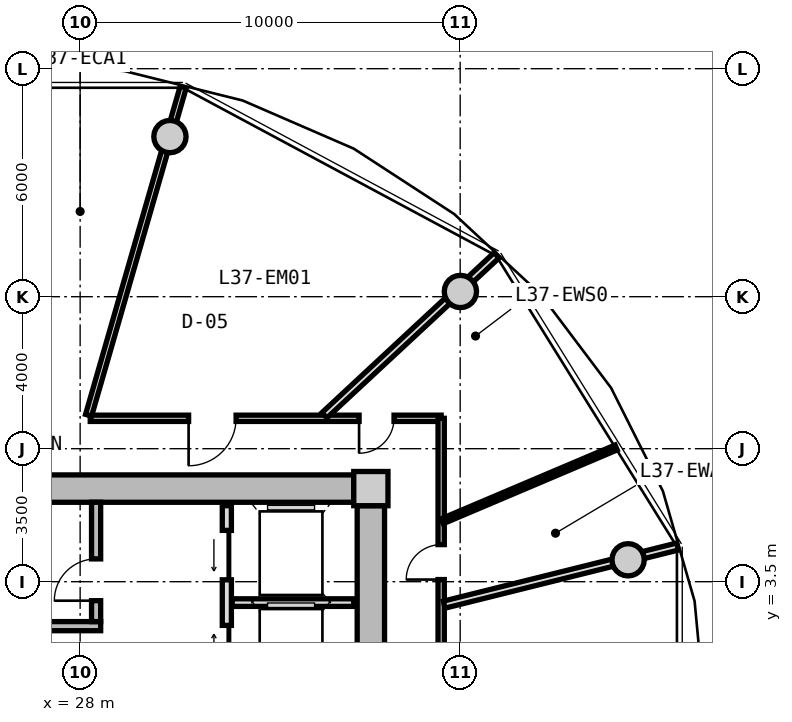
"""IFC4 building model, lengths in metres.
Left out: names, types, materials, properties, quantities, classifications, styles, units other than length and angle.
Written with IfcOpenShell. Run it as: python <this file> out.ifc"""

import sys

from ifc_helpers import new_model, si_unit, direction, frame, frame_2d, origin, origin_2d, place, context, subcontext, project, spatial, rectangle, circle, extrude, source, transform, mapped, element, fill, save


model = new_model("IFC4")
c1 = context("Model", 3, precision=1e-05, world=origin(), true_north=direction((0.0, 1.0)))
c2 = subcontext(c1, "Body", "Model", "MODEL_VIEW")
j1 = project(units=[si_unit("LENGTHUNIT", "METRE"), si_unit("PLANEANGLEUNIT", "RADIAN")], contexts=[c1])
p1 = place(None, origin())
s1 = spatial("IfcSite", under=j1, at=p1, CompositionType="ELEMENT")
p2 = place(p1, origin())
s2 = spatial("IfcBuilding", under=s1, at=p2, CompositionType="ELEMENT")
p3 = place(p2, frame((0.0, 0.0, 120.65)))
s3 = spatial("IfcBuildingStorey", under=s2, at=p3, CompositionType="ELEMENT", Elevation=120.65)
m1 = source(origin(), c2, "Body", "SweptSolid", [
    extrude(rectangle(XDim=0.9, YDim=0.9, at=origin_2d()), origin(), (0.0, 0.0, 1.0), 3.05),
])
p4 = place(p3, frame((35.65, 5.95, 0.0), z_axis=(0.0, 0.0, 1.0), x_axis=(1.0, 0.0, 0.0)))
e1 = element("IfcColumn", 1, at=p4, inside=s3, PredefinedType="COLUMN", context=c2, shape_type="MappedRepresentation", body=[
    mapped(m1, transform((0.0, 0.0, 0.0), x_axis=(1.0, 0.0, 0.0), y_axis=(0.0, 1.0, 0.0), z_axis=(0.0, 0.0, 1.0), scale=1.0)),
])
m2 = source(origin(), c2, "Body", "SweptSolid", [
    extrude(rectangle(XDim=14.4, YDim=0.72, at=frame_2d((7.2, 0.0))), origin(), (0.0, 0.0, 1.0), 2.79),
])
p5 = place(p3, frame((20.8, 5.95, 0.0), z_axis=(0.0, 0.0, 1.0), x_axis=(1.0, 0.0, 0.0)))
e2 = element("IfcWall", 2, at=p5, inside=s3, PredefinedType="SHEAR", context=c2, shape_type="MappedRepresentation", body=[
    mapped(m2, transform((0.0, 0.0, 0.0), x_axis=(1.0, 0.0, 0.0), y_axis=(0.0, 1.0, 0.0), z_axis=(0.0, 0.0, 1.0), scale=1.0)),
])
m3 = source(origin(), c2, "Body", "SweptSolid", [
    extrude(rectangle(XDim=11.0, YDim=0.72, at=frame_2d((5.5, 0.0))), origin(), (0.0, 0.0, 1.0), 2.79),
])
p6 = place(p3, frame((35.65, 5.5, 0.0), z_axis=(0.0, 0.0, 1.0), x_axis=(0.0, -1.0, 0.0)))
e3 = element("IfcWall", 3, at=p6, inside=s3, PredefinedType="SHEAR", context=c2, shape_type="MappedRepresentation", body=[
    mapped(m3, transform((0.0, 0.0, 0.0), x_axis=(1.0, 0.0, 0.0), y_axis=(0.0, 1.0, 0.0), z_axis=(0.0, 0.0, 1.0), scale=1.0)),
])
p7 = place(p6, frame((5.65, 0.0, 0.0)))
e4 = element("IfcOpeningElement", 4, at=p7, cuts=e3, PredefinedType="OPENING", context=c2, shape_type="SweptSolid", body=[
    extrude(rectangle(XDim=1.2, YDim=2.15, at=frame_2d((0.6, 1.075))), frame((0.0, 0.37, 0.0), z_axis=(0.0, -1.0, 0.0), x_axis=(1.0, 0.0, 0.0)), (0.0, 0.0, 1.0), 0.74),
])
m4 = source(origin(), c2, "Body", "SweptSolid", [
    extrude(circle(Radius=0.425, at=origin_2d()), origin(), (0.0, 0.0, 1.0), 3.05),
])
for number, where, z_axis, x_axis in (
    (5, (42.419, 4.076, 0.0), (0.0, 0.0, 1.0), (1.0, 0.0, 0.0)),
    (6, (38.006, 11.137, 0.0), (0.0, 0.0, 1.0), (1.0, 0.0, 0.0)),
    (7, (30.363, 15.213, 0.0), (0.0, 0.0, 1.0), (1.0, 0.0, 0.0)),
):
    element("IfcColumn", number, at=place(p3, frame(where, z_axis=z_axis, x_axis=x_axis)), inside=s3, PredefinedType="COLUMN", context=c2, shape_type="MappedRepresentation", body=[
        mapped(m4, transform((0.0, 0.0, 0.0), x_axis=(1.0, 0.0, 0.0), y_axis=(0.0, 1.0, 0.0), z_axis=(0.0, 0.0, 1.0), scale=1.0)),
    ])
m5 = source(origin(), c2, "Body", "SweptSolid", [
    extrude(rectangle(XDim=7.83, YDim=0.24, at=frame_2d((3.915, 0.0))), origin(), (0.0, 0.0, 1.0), 2.79),
])
p8 = place(p3, frame((20.71, 2.33, 0.0), z_axis=(0.0, 0.0, 1.0), x_axis=(1.0, 0.0, 0.0)))
e8 = element("IfcWall", 8, at=p8, inside=s3, PredefinedType="PARTITIONING", context=c2, shape_type="MappedRepresentation", body=[
    mapped(m5, transform((0.0, 0.0, 0.0), x_axis=(1.0, 0.0, 0.0), y_axis=(0.0, 1.0, 0.0), z_axis=(0.0, 0.0, 1.0), scale=1.0)),
])
m6 = source(origin(), c2, "Body", "SweptSolid", [
    extrude(rectangle(XDim=3.14, YDim=0.24, at=frame_2d((1.57, 0.0))), origin(), (0.0, 0.0, 1.0), 2.79),
])
p9 = place(p3, frame((28.42, 2.45, 0.0), z_axis=(0.0, 0.0, 1.0), x_axis=(0.0, 1.0, 0.0)))
e9 = element("IfcWall", 9, at=p9, inside=s3, PredefinedType="PARTITIONING", context=c2, shape_type="MappedRepresentation", body=[
    mapped(m6, transform((0.0, 0.0, 0.0), x_axis=(1.0, 0.0, 0.0), y_axis=(0.0, 1.0, 0.0), z_axis=(0.0, 0.0, 1.0), scale=1.0)),
])
p10 = place(p9, frame((0.55, 0.0, 0.0)))
e10 = element("IfcOpeningElement", 10, at=p10, cuts=e9, PredefinedType="OPENING", context=c2, shape_type="SweptSolid", body=[
    extrude(rectangle(XDim=1.1, YDim=2.15, at=frame_2d((0.55, 1.075))), frame((0.0, 0.13, 0.0), z_axis=(0.0, -1.0, 0.0), x_axis=(1.0, 0.0, 0.0)), (0.0, 0.0, 1.0), 0.26),
])
m7 = source(origin(), c2, "Body", "SweptSolid", [
    extrude(rectangle(XDim=5.0, YDim=0.24, at=frame_2d((2.5, 0.0))), origin(), (0.0, 0.0, 1.0), 2.775),
])
p11 = place(p3, frame((31.86, 0.5, 0.0), z_axis=(0.0, 0.0, 1.0), x_axis=(0.0, 1.0, 0.0)))
e11 = element("IfcWall", 11, at=p11, inside=s3, PredefinedType="PARTITIONING", context=c2, shape_type="MappedRepresentation", body=[
    mapped(m7, transform((0.0, 0.0, 0.0), x_axis=(1.0, 0.0, 0.0), y_axis=(0.0, 1.0, 0.0), z_axis=(0.0, 0.0, 1.0), scale=1.0)),
])
p12 = place(p11, frame((3.05, 0.0, 0.0)))
e12 = element("IfcOpeningElement", 12, at=p12, cuts=e11, PredefinedType="OPENING", context=c2, shape_type="SweptSolid", body=[
    extrude(rectangle(XDim=1.3, YDim=2.2, at=frame_2d((0.65, 1.1))), frame((0.0, 0.13, 0.0), z_axis=(0.0, -1.0, 0.0), x_axis=(1.0, 0.0, 0.0)), (0.0, 0.0, 1.0), 0.26),
])
p13 = place(p11, frame((0.55, 0.0, 0.0)))
e13 = element("IfcOpeningElement", 13, at=p13, cuts=e11, PredefinedType="OPENING", context=c2, shape_type="SweptSolid", body=[
    extrude(rectangle(XDim=1.3, YDim=2.2, at=frame_2d((0.65, 1.1))), frame((0.0, 0.13, 0.0), z_axis=(0.0, -1.0, 0.0), x_axis=(1.0, 0.0, 0.0)), (0.0, 0.0, 1.0), 0.26),
])
m8 = source(origin(), c2, "Body", "SweptSolid", [
    extrude(rectangle(XDim=3.2, YDim=0.2, at=frame_2d((1.6, 0.0))), origin(), (0.0, 0.0, 1.0), 2.775),
])
p14 = place(p3, frame((32.0, 2.95, 0.0), z_axis=(0.0, 0.0, 1.0), x_axis=(1.0, 0.0, 0.0)))
e14 = element("IfcWall", 14, at=p14, inside=s3, PredefinedType="PARTITIONING", context=c2, shape_type="MappedRepresentation", body=[
    mapped(m8, transform((0.0, 0.0, 0.0), x_axis=(1.0, 0.0, 0.0), y_axis=(0.0, 1.0, 0.0), z_axis=(0.0, 0.0, 1.0), scale=1.0)),
])
m9 = source(origin(), c2, "Body", "SweptSolid", [
    extrude(rectangle(XDim=9.234, YDim=0.165, at=frame_2d((4.617, 0.0))), origin(), (0.0, 0.0, 1.0), 2.775),
])
p15 = place(p3, frame((28.266, 7.8, 0.0), z_axis=(0.0, 0.0, 1.0), x_axis=(1.0, 0.0, 0.0)))
e15 = element("IfcWall", 15, at=p15, inside=s3, PredefinedType="PARTITIONING", context=c2, shape_type="MappedRepresentation", body=[
    mapped(m9, transform((0.0, 0.0, 0.0), x_axis=(1.0, 0.0, 0.0), y_axis=(0.0, 1.0, 0.0), z_axis=(0.0, 0.0, 1.0), scale=1.0)),
])
p16 = place(p15, frame((7.074, 0.0, 0.0)))
e16 = element("IfcOpeningElement", 16, at=p16, cuts=e15, PredefinedType="OPENING", context=c2, shape_type="SweptSolid", body=[
    extrude(rectangle(XDim=0.92, YDim=2.1, at=frame_2d((0.46, 1.05))), frame((0.0, 0.093, 0.0), z_axis=(0.0, -1.0, 0.0), x_axis=(1.0, 0.0, 0.0)), (0.0, 0.0, 1.0), 0.185),
])
p17 = place(p15, frame((2.588, 0.0, 0.0)))
e17 = element("IfcOpeningElement", 17, at=p17, cuts=e15, PredefinedType="OPENING", context=c2, shape_type="SweptSolid", body=[
    extrude(rectangle(XDim=1.25, YDim=2.2, at=frame_2d((0.625, 1.1))), frame((0.0, 0.093, 0.0), z_axis=(0.0, -1.0, 0.0), x_axis=(1.0, 0.0, 0.0)), (0.0, 0.0, 1.0), 0.185),
])
m10 = source(origin(), c2, "Body", "SweptSolid", [
    extrude(rectangle(XDim=15.6, YDim=0.165, at=frame_2d((7.8, 0.0))), origin(), (0.0, 0.0, 1.0), 2.775),
])
p18 = place(p3, frame((37.5, 7.8, 0.0), z_axis=(0.0, 0.0, 1.0), x_axis=(0.0, -1.0, 0.0)))
e18 = element("IfcWall", 18, at=p18, inside=s3, PredefinedType="PARTITIONING", context=c2, shape_type="MappedRepresentation", body=[
    mapped(m10, transform((0.0, 0.0, 0.0), x_axis=(1.0, 0.0, 0.0), y_axis=(0.0, 1.0, 0.0), z_axis=(0.0, 0.0, 1.0), scale=1.0)),
])
p19 = place(p18, frame((12.094, 0.0, 0.0)))
e19 = element("IfcOpeningElement", 19, at=p19, cuts=e18, PredefinedType="OPENING", context=c2, shape_type="SweptSolid", body=[
    extrude(rectangle(XDim=1.05, YDim=2.15, at=frame_2d((0.525, 1.075))), frame((0.0, 0.093, 0.0), z_axis=(0.0, -1.0, 0.0), x_axis=(1.0, 0.0, 0.0)), (0.0, 0.0, 1.0), 0.185),
])
p20 = place(p18, frame((5.971, 0.0, 0.0)))
e20 = element("IfcOpeningElement", 20, at=p20, cuts=e18, PredefinedType="OPENING", context=c2, shape_type="SweptSolid", body=[
    extrude(rectangle(XDim=1.05, YDim=2.15, at=frame_2d((0.525, 1.075))), frame((0.0, 0.093, 0.0), z_axis=(0.0, -1.0, 0.0), x_axis=(1.0, 0.0, 0.0)), (0.0, 0.0, 1.0), 0.185),
])
p21 = place(p18, frame((3.324, 0.0, 0.0)))
e21 = element("IfcOpeningElement", 21, at=p21, cuts=e18, PredefinedType="OPENING", context=c2, shape_type="SweptSolid", body=[
    extrude(rectangle(XDim=0.92, YDim=2.1, at=frame_2d((0.46, 1.05))), frame((0.0, 0.093, 0.0), z_axis=(0.0, -1.0, 0.0), x_axis=(1.0, 0.0, 0.0)), (0.0, 0.0, 1.0), 0.185),
])
m11 = source(origin(), c2, "Body", "SweptSolid", [
    extrude(rectangle(XDim=8.989, YDim=0.165, at=frame_2d((4.495, 0.0))), origin(), (0.0, 0.0, 1.0), 2.275),
])
p22 = place(p3, frame((28.222, 7.88, 0.0), z_axis=(0.0, 0.0, 1.0), x_axis=(0.27702323008, 0.960863221274, 0.0)))
e22 = element("IfcWall", 22, at=p22, inside=s3, PredefinedType="PARTITIONING", context=c2, shape_type="MappedRepresentation", body=[
    mapped(m11, transform((0.0, 0.0, 0.0), x_axis=(1.0, 0.0, 0.0), y_axis=(0.0, 1.0, 0.0), z_axis=(0.0, 0.0, 1.0), scale=1.0)),
])
m12 = source(origin(), c2, "Body", "SweptSolid", [
    extrude(rectangle(XDim=6.331, YDim=0.19, at=frame_2d((3.165, 0.0))), origin(), (0.0, 0.0, 1.0), 2.275),
])
p23 = place(p3, frame((37.58, 2.896, 0.0), z_axis=(0.0, 0.0, 1.0), x_axis=(0.97036440661, 0.241646267062, 0.0)))
e23 = element("IfcWall", 23, at=p23, inside=s3, PredefinedType="PARTITIONING", context=c2, shape_type="MappedRepresentation", body=[
    mapped(m12, transform((0.0, 0.0, 0.0), x_axis=(1.0, 0.0, 0.0), y_axis=(0.0, 1.0, 0.0), z_axis=(0.0, 0.0, 1.0), scale=1.0)),
])
m13 = source(origin(), c2, "Body", "SweptSolid", [
    extrude(rectangle(XDim=6.187, YDim=0.19, at=frame_2d((3.093, 0.0))), origin(), (0.0, 0.0, 1.0), 2.275),
])
p24 = place(p3, frame((34.429, 7.88, 0.0), z_axis=(0.0, 0.0, 1.0), x_axis=(0.732501077882, 0.680765870841, 0.0)))
e24 = element("IfcWall", 24, at=p24, inside=s3, PredefinedType="PARTITIONING", context=c2, shape_type="MappedRepresentation", body=[
    mapped(m13, transform((0.0, 0.0, 0.0), x_axis=(1.0, 0.0, 0.0), y_axis=(0.0, 1.0, 0.0), z_axis=(0.0, 0.0, 1.0), scale=1.0)),
])
m14 = source(origin(), c2, "Body", "SweptSolid", [
    extrude(rectangle(XDim=4.968, YDim=0.14, at=frame_2d((2.484, 0.0))), origin(), (0.0, 0.0, 1.0), 2.775),
])
p25 = place(p3, frame((37.53, 5.092, 0.0), z_axis=(0.0, 0.0, 1.0), x_axis=(0.920595165864, 0.39051829738, 0.0)))
e25 = element("IfcWall", 25, at=p25, inside=s3, PredefinedType="PARTITIONING", context=c2, shape_type="MappedRepresentation", body=[
    mapped(m14, transform((0.0, 0.0, 0.0), x_axis=(1.0, 0.0, 0.0), y_axis=(0.0, 1.0, 0.0), z_axis=(0.0, 0.0, 1.0), scale=1.0)),
])
m15 = source(origin(), c2, "Body", "SweptSolid", [
    extrude(rectangle(XDim=1.1, YDim=2.15, at=frame_2d((0.55, 1.075))), frame((0.0, 0.025, 0.0), z_axis=(0.0, -1.0, 0.0), x_axis=(1.0, 0.0, 0.0)), (0.0, 0.0, 1.0), 0.05),
])
p26 = place(p10, origin())
e26 = element("IfcDoor", 26, at=p26, inside=s3, OperationType="SINGLE_SWING_LEFT", PredefinedType="DOOR", context=c2, shape_type="MappedRepresentation", body=[
    mapped(m15, transform((0.0, 0.0, 0.0), x_axis=(1.0, 0.0, 0.0), y_axis=(0.0, 1.0, 0.0), z_axis=(0.0, 0.0, 1.0), scale=1.0)),
])
fill(e10, e26)
m16 = source(origin(), c2, "Body", "SweptSolid", [
    extrude(rectangle(XDim=1.3, YDim=2.2, at=frame_2d((0.65, 1.1))), frame((0.0, 0.025, 0.0), z_axis=(0.0, -1.0, 0.0), x_axis=(1.0, 0.0, 0.0)), (0.0, 0.0, 1.0), 0.05),
])
p27 = place(p12, origin())
e27 = element("IfcDoor", 27, at=p27, inside=s3, OperationType="SLIDING_TO_LEFT", PredefinedType="DOOR", context=c2, shape_type="MappedRepresentation", body=[
    mapped(m16, transform((0.0, 0.0, 0.0), x_axis=(1.0, 0.0, 0.0), y_axis=(0.0, 1.0, 0.0), z_axis=(0.0, 0.0, 1.0), scale=1.0)),
])
fill(e12, e27)
p28 = place(p13, origin())
e28 = element("IfcDoor", 28, at=p28, inside=s3, OperationType="SLIDING_TO_RIGHT", PredefinedType="DOOR", context=c2, shape_type="MappedRepresentation", body=[
    mapped(m16, transform((0.0, 0.0, 0.0), x_axis=(1.0, 0.0, 0.0), y_axis=(0.0, 1.0, 0.0), z_axis=(0.0, 0.0, 1.0), scale=1.0)),
])
fill(e13, e28)
m17 = source(origin(), c2, "Body", "SweptSolid", [
    extrude(rectangle(XDim=0.92, YDim=2.1, at=frame_2d((0.46, 1.05))), frame((0.0, 0.025, 0.0), z_axis=(0.0, -1.0, 0.0), x_axis=(1.0, 0.0, 0.0)), (0.0, 0.0, 1.0), 0.05),
])
p29 = place(p21, frame((0.92, 0.0, 0.0), z_axis=(0.0, 0.0, 1.0), x_axis=(-1.0, 0.0, 0.0)))
e29 = element("IfcDoor", 29, at=p29, inside=s3, OperationType="SINGLE_SWING_LEFT", PredefinedType="DOOR", context=c2, shape_type="MappedRepresentation", body=[
    mapped(m17, transform((0.0, 0.0, 0.0), x_axis=(1.0, 0.0, 0.0), y_axis=(0.0, 1.0, 0.0), z_axis=(0.0, 0.0, 1.0), scale=1.0)),
])
fill(e21, e29)
p30 = place(p16, frame((0.92, 0.0, 0.0), z_axis=(0.0, 0.0, 1.0), x_axis=(-1.0, 0.0, 0.0)))
e30 = element("IfcDoor", 30, at=p30, inside=s3, OperationType="SINGLE_SWING_RIGHT", PredefinedType="DOOR", context=c2, shape_type="MappedRepresentation", body=[
    mapped(m17, transform((0.0, 0.0, 0.0), x_axis=(1.0, 0.0, 0.0), y_axis=(0.0, 1.0, 0.0), z_axis=(0.0, 0.0, 1.0), scale=1.0)),
])
fill(e16, e30)
m18 = source(origin(), c2, "Body", "SweptSolid", [
    extrude(rectangle(XDim=1.25, YDim=2.2, at=frame_2d((0.625, 1.1))), frame((0.0, 0.025, 0.0), z_axis=(0.0, -1.0, 0.0), x_axis=(1.0, 0.0, 0.0)), (0.0, 0.0, 1.0), 0.05),
])
p31 = place(p17, frame((1.25, 0.0, 0.0), z_axis=(0.0, 0.0, 1.0), x_axis=(-1.0, 0.0, 0.0)))
e31 = element("IfcDoor", 31, at=p31, inside=s3, OperationType="SINGLE_SWING_RIGHT", PredefinedType="DOOR", context=c2, shape_type="MappedRepresentation", body=[
    mapped(m18, transform((0.0, 0.0, 0.0), x_axis=(1.0, 0.0, 0.0), y_axis=(0.0, 1.0, 0.0), z_axis=(0.0, 0.0, 1.0), scale=1.0)),
])
fill(e17, e31)
save(model, sys.argv[1])
